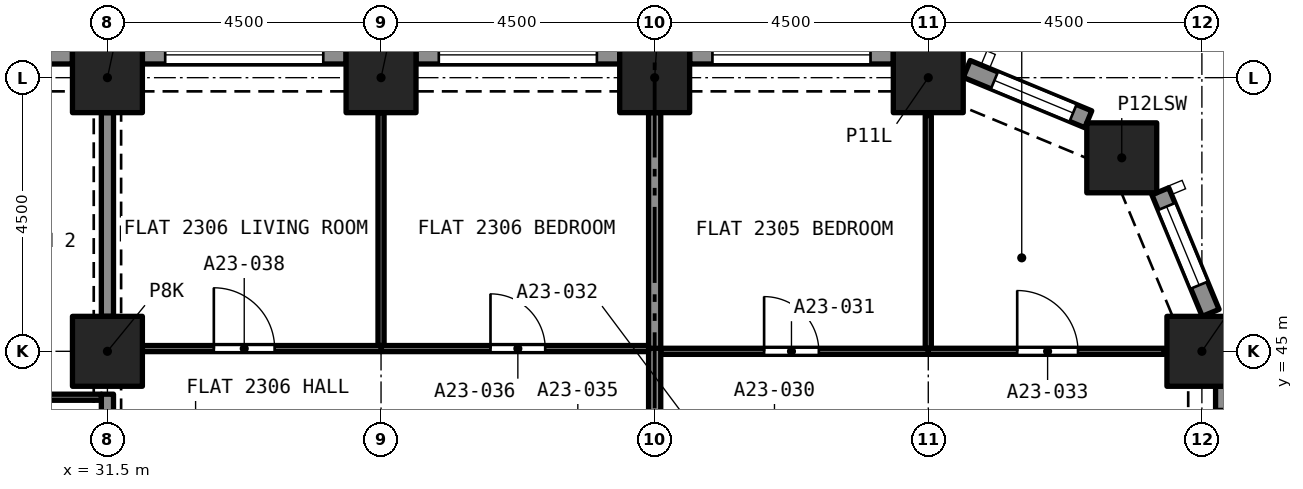
"""IFC4 building model, lengths in metres.
Left out: names, types, materials, properties, quantities, classifications, styles, units other than length and angle.
Written with IfcOpenShell. Run it as: python <this file> out.ifc"""

import sys

from ifc_helpers import new_model, si_unit, direction, frame, frame_2d, origin, origin_2d, place, context, subcontext, project, spatial, rectangle, extrude, element, fill, save


model = new_model("IFC4")
c1 = context("Model", 3, precision=1e-05, world=origin(), true_north=direction((0.0, 1.0)))
c2 = subcontext(c1, "Body", "Model", "MODEL_VIEW")
j1 = project(units=[si_unit("LENGTHUNIT", "METRE"), si_unit("PLANEANGLEUNIT", "RADIAN")], contexts=[c1])
p1 = place(None, origin())
s1 = spatial("IfcSite", under=j1, at=p1, CompositionType="ELEMENT")
p2 = place(p1, origin())
s2 = spatial("IfcBuilding", under=s1, at=p2, CompositionType="ELEMENT")
p3 = place(p2, frame((0.0, 0.0, 86.4)))
s3 = spatial("IfcBuildingStorey", under=s2, at=p3, CompositionType="ELEMENT", Elevation=86.4)
for number, where, z_axis, x_axis in (
    (1, (31.5, 45.0, 0.0), (0.0, 0.0, 1.0), (1.0, 0.0, 0.0)),
    (2, (49.5, 45.0, 0.0), (0.0, 0.0, 1.0), (1.0, 0.0, 0.0)),
    (3, (48.182, 48.182, 0.0), (0.0, 0.0, 1.0), (1.0, 0.0, 0.0)),
    (4, (31.5, 49.5, 0.0), (0.0, 0.0, 1.0), (1.0, 0.0, 0.0)),
    (5, (36.0, 49.5, 0.0), (0.0, 0.0, 1.0), (1.0, 0.0, 0.0)),
    (6, (40.5, 49.5, 0.0), (0.0, 0.0, 1.0), (1.0, 0.0, 0.0)),
    (7, (45.0, 49.5, 0.0), (0.0, 0.0, 1.0), (1.0, 0.0, 0.0)),
):
    element("IfcColumn", number, at=place(p3, frame(where, z_axis=z_axis, x_axis=x_axis)), inside=s3, PredefinedType="COLUMN", context=c2, shape_type="SweptSolid", body=[
        extrude(rectangle(XDim=1.15, YDim=1.15, at=origin_2d()), origin(), (0.0, 0.0, 1.0), 3.2),
    ])
p4 = place(p3, frame((49.875, 44.425, 0.0), z_axis=(0.0, 0.0, 1.0), x_axis=(0.0, -1.0, 0.0)))
e8 = element("IfcWall", 8, at=p4, inside=s3, PredefinedType="SOLIDWALL", context=c2, shape_type="SweptSolid", body=[
    extrude(rectangle(XDim=3.35, YDim=0.3, at=frame_2d((1.675, 0.0))), origin(), (0.0, 0.0, 1.0), 3.2),
])
p5 = place(p4, frame((0.375, 0.0, 0.45)))
e9 = element("IfcOpeningElement", 9, at=p5, cuts=e8, PredefinedType="OPENING", context=c2, shape_type="SweptSolid", body=[
    extrude(rectangle(XDim=2.6, YDim=1.95, at=frame_2d((1.3, 0.975))), frame((0.0, 0.16, 0.0), z_axis=(0.0, -1.0, 0.0), x_axis=(1.0, 0.0, 0.0)), (0.0, 0.0, 1.0), 0.32),
])
p6 = place(p3, frame((48.816, 47.631, 0.0), z_axis=(0.0, 0.0, 1.0), x_axis=(0.382723818695, -0.923862802911, 0.0)))
e10 = element("IfcWall", 10, at=p6, inside=s3, PredefinedType="SOLIDWALL", context=c2, shape_type="SweptSolid", body=[
    extrude(rectangle(XDim=2.164, YDim=0.3, at=frame_2d((1.082, 0.0))), origin(), (0.0, 0.0, 1.0), 3.2),
])
p7 = place(p6, frame((0.271, 0.0, 0.45)))
e11 = element("IfcOpeningElement", 11, at=p7, cuts=e10, PredefinedType="OPENING", context=c2, shape_type="SweptSolid", body=[
    extrude(rectangle(XDim=1.4, YDim=1.95, at=frame_2d((0.7, 0.975))), frame((0.0, 0.16, 0.0), z_axis=(0.0, -1.0, 0.0), x_axis=(1.0, 0.0, 0.0)), (0.0, 0.0, 1.0), 0.32),
])
p8 = place(p3, frame((45.632, 49.644, 0.0), z_axis=(0.0, 0.0, 1.0), x_axis=(0.923862802911, -0.382723818695, 0.0)))
e12 = element("IfcWall", 12, at=p8, inside=s3, PredefinedType="SOLIDWALL", context=c2, shape_type="SweptSolid", body=[
    extrude(rectangle(XDim=2.164, YDim=0.3, at=frame_2d((1.082, 0.0))), origin(), (0.0, 0.0, 1.0), 3.2),
])
p9 = place(p8, frame((0.493, 0.0, 0.45)))
e13 = element("IfcOpeningElement", 13, at=p9, cuts=e12, PredefinedType="OPENING", context=c2, shape_type="SweptSolid", body=[
    extrude(rectangle(XDim=1.4, YDim=1.95, at=frame_2d((0.7, 0.975))), frame((0.0, 0.16, 0.0), z_axis=(0.0, -1.0, 0.0), x_axis=(1.0, 0.0, 0.0)), (0.0, 0.0, 1.0), 0.32),
])
p10 = place(p3, frame((41.075, 49.875, 0.0), z_axis=(0.0, 0.0, 1.0), x_axis=(1.0, 0.0, 0.0)))
e14 = element("IfcWall", 14, at=p10, inside=s3, PredefinedType="SOLIDWALL", context=c2, shape_type="SweptSolid", body=[
    extrude(rectangle(XDim=3.35, YDim=0.3, at=frame_2d((1.675, 0.0))), origin(), (0.0, 0.0, 1.0), 3.2),
])
p11 = place(p10, frame((0.375, 0.0, 0.45)))
e15 = element("IfcOpeningElement", 15, at=p11, cuts=e14, PredefinedType="OPENING", context=c2, shape_type="SweptSolid", body=[
    extrude(rectangle(XDim=2.6, YDim=1.95, at=frame_2d((1.3, 0.975))), frame((0.0, 0.16, 0.0), z_axis=(0.0, -1.0, 0.0), x_axis=(1.0, 0.0, 0.0)), (0.0, 0.0, 1.0), 0.32),
])
p12 = place(p3, frame((36.575, 49.875, 0.0), z_axis=(0.0, 0.0, 1.0), x_axis=(1.0, 0.0, 0.0)))
e16 = element("IfcWall", 16, at=p12, inside=s3, PredefinedType="SOLIDWALL", context=c2, shape_type="SweptSolid", body=[
    extrude(rectangle(XDim=3.35, YDim=0.3, at=frame_2d((1.675, 0.0))), origin(), (0.0, 0.0, 1.0), 3.2),
])
p13 = place(p12, frame((0.375, 0.0, 0.45)))
e17 = element("IfcOpeningElement", 17, at=p13, cuts=e16, PredefinedType="OPENING", context=c2, shape_type="SweptSolid", body=[
    extrude(rectangle(XDim=2.6, YDim=1.95, at=frame_2d((1.3, 0.975))), frame((0.0, 0.16, 0.0), z_axis=(0.0, -1.0, 0.0), x_axis=(1.0, 0.0, 0.0)), (0.0, 0.0, 1.0), 0.32),
])
p14 = place(p3, frame((32.075, 49.875, 0.0), z_axis=(0.0, 0.0, 1.0), x_axis=(1.0, 0.0, 0.0)))
e18 = element("IfcWall", 18, at=p14, inside=s3, PredefinedType="SOLIDWALL", context=c2, shape_type="SweptSolid", body=[
    extrude(rectangle(XDim=3.35, YDim=0.3, at=frame_2d((1.675, 0.0))), origin(), (0.0, 0.0, 1.0), 3.2),
])
p15 = place(p14, frame((0.375, 0.0, 0.45)))
e19 = element("IfcOpeningElement", 19, at=p15, cuts=e18, PredefinedType="OPENING", context=c2, shape_type="SweptSolid", body=[
    extrude(rectangle(XDim=2.6, YDim=1.95, at=frame_2d((1.3, 0.975))), frame((0.0, 0.16, 0.0), z_axis=(0.0, -1.0, 0.0), x_axis=(1.0, 0.0, 0.0)), (0.0, 0.0, 1.0), 0.32),
])
p16 = place(p3, frame((27.575, 49.875, 0.0), z_axis=(0.0, 0.0, 1.0), x_axis=(1.0, 0.0, 0.0)))
e20 = element("IfcWall", 20, at=p16, inside=s3, PredefinedType="SOLIDWALL", context=c2, shape_type="SweptSolid", body=[
    extrude(rectangle(XDim=3.35, YDim=0.3, at=frame_2d((1.675, 0.0))), origin(), (0.0, 0.0, 1.0), 3.2),
])
p17 = place(p16, frame((0.375, 0.0, 0.45)))
e21 = element("IfcOpeningElement", 21, at=p17, cuts=e20, PredefinedType="OPENING", context=c2, shape_type="SweptSolid", body=[
    extrude(rectangle(XDim=2.6, YDim=1.95, at=frame_2d((1.3, 0.975))), frame((0.0, 0.16, 0.0), z_axis=(0.0, -1.0, 0.0), x_axis=(1.0, 0.0, 0.0)), (0.0, 0.0, 1.0), 0.32),
])
p18 = place(p3, frame((40.6, 45.0, 0.0), z_axis=(0.0, 0.0, 1.0), x_axis=(1.0, 0.0, 0.0)))
e22 = element("IfcWall", 22, at=p18, inside=s3, PredefinedType="PARTITIONING", context=c2, shape_type="SweptSolid", body=[
    extrude(rectangle(XDim=4.4, YDim=0.1, at=frame_2d((2.2, 0.0))), origin(), (0.0, 0.0, 1.0), 2.9),
])
p19 = place(p18, frame((1.7, 0.0, 0.0)))
e23 = element("IfcOpeningElement", 23, at=p19, cuts=e22, PredefinedType="OPENING", context=c2, shape_type="SweptSolid", body=[
    extrude(rectangle(XDim=0.9, YDim=2.1, at=frame_2d((0.45, 1.05))), frame((0.0, 0.06, 0.0), z_axis=(0.0, -1.0, 0.0), x_axis=(1.0, 0.0, 0.0)), (0.0, 0.0, 1.0), 0.12),
])
p20 = place(p3, frame((45.0, 45.05, 0.0), z_axis=(0.0, 0.0, 1.0), x_axis=(0.0, 1.0, 0.0)))
e24 = element("IfcWall", 24, at=p20, inside=s3, PredefinedType="PARTITIONING", context=c2, shape_type="SweptSolid", body=[
    extrude(rectangle(XDim=3.828, YDim=0.1, at=frame_2d((1.914, 0.0))), origin(), (0.0, 0.0, 1.0), 2.9),
])
p21 = place(p3, frame((40.5, 44.995, 0.0), z_axis=(0.0, 0.0, 1.0), x_axis=(0.0, 1.0, 0.0)))
e25 = element("IfcWall", 25, at=p21, inside=s3, PredefinedType="PARTITIONING", context=c2, shape_type="SweptSolid", body=[
    extrude(rectangle(XDim=3.93, YDim=0.2, at=frame_2d((1.965, 0.0))), origin(), (0.0, 0.0, 1.0), 2.9),
])
p22 = place(p3, frame((45.0, 45.0, 0.0), z_axis=(0.0, 0.0, 1.0), x_axis=(1.0, 0.0, 0.0)))
e26 = element("IfcWall", 26, at=p22, inside=s3, PredefinedType="PARTITIONING", context=c2, shape_type="SweptSolid", body=[
    extrude(rectangle(XDim=3.878, YDim=0.1, at=frame_2d((1.939, 0.0))), origin(), (0.0, 0.0, 1.0), 2.9),
])
p23 = place(p22, frame((1.462, 0.0, 0.0)))
e27 = element("IfcOpeningElement", 27, at=p23, cuts=e26, PredefinedType="OPENING", context=c2, shape_type="SweptSolid", body=[
    extrude(rectangle(XDim=1.0, YDim=2.1, at=frame_2d((0.5, 1.05))), frame((0.0, 0.06, 0.0), z_axis=(0.0, -1.0, 0.0), x_axis=(1.0, 0.0, 0.0)), (0.0, 0.0, 1.0), 0.12),
])
p24 = place(p3, frame((40.5, 40.35, 0.0), z_axis=(0.0, 0.0, 1.0), x_axis=(0.0, 1.0, 0.0)))
e28 = element("IfcWall", 28, at=p24, inside=s3, PredefinedType="PARTITIONING", context=c2, shape_type="SweptSolid", body=[
    extrude(rectangle(XDim=4.7, YDim=0.2, at=frame_2d((2.35, 0.0))), origin(), (0.0, 0.0, 1.0), 2.9),
])
p25 = place(p3, frame((36.0, 45.045, 0.0), z_axis=(0.0, 0.0, 1.0), x_axis=(1.0, 0.0, 0.0)))
e29 = element("IfcWall", 29, at=p25, inside=s3, PredefinedType="PARTITIONING", context=c2, shape_type="SweptSolid", body=[
    extrude(rectangle(XDim=4.4, YDim=0.1, at=frame_2d((2.2, 0.0))), origin(), (0.0, 0.0, 1.0), 2.9),
])
p26 = place(p25, frame((1.8, 0.0, 0.0)))
e30 = element("IfcOpeningElement", 30, at=p26, cuts=e29, PredefinedType="OPENING", context=c2, shape_type="SweptSolid", body=[
    extrude(rectangle(XDim=0.9, YDim=2.1, at=frame_2d((0.45, 1.05))), frame((0.0, 0.06, 0.0), z_axis=(0.0, -1.0, 0.0), x_axis=(1.0, 0.0, 0.0)), (0.0, 0.0, 1.0), 0.12),
])
p27 = place(p3, frame((36.0, 45.095, 0.0), z_axis=(0.0, 0.0, 1.0), x_axis=(0.0, 1.0, 0.0)))
e31 = element("IfcWall", 31, at=p27, inside=s3, PredefinedType="PARTITIONING", context=c2, shape_type="SweptSolid", body=[
    extrude(rectangle(XDim=3.83, YDim=0.1, at=frame_2d((1.915, 0.0))), origin(), (0.0, 0.0, 1.0), 2.9),
])
p28 = place(p3, frame((32.075, 45.045, 0.0), z_axis=(0.0, 0.0, 1.0), x_axis=(1.0, 0.0, 0.0)))
e32 = element("IfcWall", 32, at=p28, inside=s3, PredefinedType="PARTITIONING", context=c2, shape_type="SweptSolid", body=[
    extrude(rectangle(XDim=3.925, YDim=0.1, at=frame_2d((1.962, 0.0))), origin(), (0.0, 0.0, 1.0), 2.9),
])
p29 = place(p28, frame((1.175, 0.0, 0.0)))
e33 = element("IfcOpeningElement", 33, at=p29, cuts=e32, PredefinedType="OPENING", context=c2, shape_type="SweptSolid", body=[
    extrude(rectangle(XDim=1.0, YDim=2.1, at=frame_2d((0.5, 1.05))), frame((0.0, 0.06, 0.0), z_axis=(0.0, -1.0, 0.0), x_axis=(1.0, 0.0, 0.0)), (0.0, 0.0, 1.0), 0.12),
])
p30 = place(p3, frame((31.5, 41.075, 0.0), z_axis=(0.0, 0.0, 1.0), x_axis=(0.0, 1.0, 0.0)))
e34 = element("IfcWall", 34, at=p30, inside=s3, PredefinedType="PARTITIONING", context=c2, shape_type="SweptSolid", body=[
    extrude(rectangle(XDim=3.22, YDim=0.2, at=frame_2d((1.61, 0.0))), origin(), (0.0, 0.0, 1.0), 2.38),
])
p31 = place(p3, frame((31.5, 45.575, 0.0), z_axis=(0.0, 0.0, 1.0), x_axis=(0.0, 1.0, 0.0)))
e35 = element("IfcWall", 35, at=p31, inside=s3, PredefinedType="PARTITIONING", context=c2, shape_type="SweptSolid", body=[
    extrude(rectangle(XDim=3.35, YDim=0.2, at=frame_2d((1.675, 0.0))), origin(), (0.0, 0.0, 1.0), 2.38),
])
p32 = place(p3, frame((27.0, 44.245, 0.0), z_axis=(0.0, 0.0, 1.0), x_axis=(1.0, 0.0, 0.0)))
e36 = element("IfcWall", 36, at=p32, inside=s3, PredefinedType="PARTITIONING", context=c2, shape_type="SweptSolid", body=[
    extrude(rectangle(XDim=4.4, YDim=0.1, at=frame_2d((2.2, 0.0))), origin(), (0.0, 0.0, 1.0), 2.75),
])
p33 = place(p32, frame((1.8, 0.0, 0.0)))
e37 = element("IfcOpeningElement", 37, at=p33, cuts=e36, PredefinedType="OPENING", context=c2, shape_type="SweptSolid", body=[
    extrude(rectangle(XDim=0.9, YDim=2.1, at=frame_2d((0.45, 1.05))), frame((0.0, 0.06, 0.0), z_axis=(0.0, -1.0, 0.0), x_axis=(1.0, 0.0, 0.0)), (0.0, 0.0, 1.0), 0.12),
])
p34 = place(p7, origin())
e38 = element("IfcWindow", 38, at=p34, inside=s3, PartitioningType="SINGLE_PANEL", PredefinedType="WINDOW", context=c2, shape_type="SweptSolid", body=[
    extrude(rectangle(XDim=1.4, YDim=1.95, at=frame_2d((0.7, 0.975))), frame((0.0, 0.03, 0.0), z_axis=(0.0, -1.0, 0.0), x_axis=(1.0, 0.0, 0.0)), (0.0, 0.0, 1.0), 0.06),
])
fill(e11, e38)
p35 = place(p9, origin())
e39 = element("IfcWindow", 39, at=p35, inside=s3, PartitioningType="SINGLE_PANEL", PredefinedType="WINDOW", context=c2, shape_type="SweptSolid", body=[
    extrude(rectangle(XDim=1.4, YDim=1.95, at=frame_2d((0.7, 0.975))), frame((0.0, 0.03, 0.0), z_axis=(0.0, -1.0, 0.0), x_axis=(1.0, 0.0, 0.0)), (0.0, 0.0, 1.0), 0.06),
])
fill(e13, e39)
p36 = place(p11, origin())
e40 = element("IfcWindow", 40, at=p36, inside=s3, PartitioningType="SINGLE_PANEL", PredefinedType="WINDOW", context=c2, shape_type="SweptSolid", body=[
    extrude(rectangle(XDim=2.6, YDim=1.95, at=frame_2d((1.3, 0.975))), frame((0.0, 0.03, 0.0), z_axis=(0.0, -1.0, 0.0), x_axis=(1.0, 0.0, 0.0)), (0.0, 0.0, 1.0), 0.06),
])
fill(e15, e40)
p37 = place(p13, origin())
e41 = element("IfcWindow", 41, at=p37, inside=s3, PartitioningType="SINGLE_PANEL", PredefinedType="WINDOW", context=c2, shape_type="SweptSolid", body=[
    extrude(rectangle(XDim=2.6, YDim=1.95, at=frame_2d((1.3, 0.975))), frame((0.0, 0.03, 0.0), z_axis=(0.0, -1.0, 0.0), x_axis=(1.0, 0.0, 0.0)), (0.0, 0.0, 1.0), 0.06),
])
fill(e17, e41)
p38 = place(p15, origin())
e42 = element("IfcWindow", 42, at=p38, inside=s3, PartitioningType="SINGLE_PANEL", PredefinedType="WINDOW", context=c2, shape_type="SweptSolid", body=[
    extrude(rectangle(XDim=2.6, YDim=1.95, at=frame_2d((1.3, 0.975))), frame((0.0, 0.03, 0.0), z_axis=(0.0, -1.0, 0.0), x_axis=(1.0, 0.0, 0.0)), (0.0, 0.0, 1.0), 0.06),
])
fill(e19, e42)
p39 = place(p19, origin())
e43 = element("IfcDoor", 43, at=p39, inside=s3, OperationType="SINGLE_SWING_LEFT", PredefinedType="DOOR", context=c2, shape_type="SweptSolid", body=[
    extrude(rectangle(XDim=0.9, YDim=2.1, at=frame_2d((0.45, 1.05))), frame((0.0, 0.025, 0.0), z_axis=(0.0, -1.0, 0.0), x_axis=(1.0, 0.0, 0.0)), (0.0, 0.0, 1.0), 0.05),
])
fill(e23, e43)
p40 = place(p23, origin())
e44 = element("IfcDoor", 44, at=p40, inside=s3, OperationType="SINGLE_SWING_RIGHT", PredefinedType="DOOR", context=c2, shape_type="SweptSolid", body=[
    extrude(rectangle(XDim=1.0, YDim=2.1, at=frame_2d((0.5, 1.05))), frame((0.0, 0.025, 0.0), z_axis=(0.0, -1.0, 0.0), x_axis=(1.0, 0.0, 0.0)), (0.0, 0.0, 1.0), 0.05),
])
fill(e27, e44)
p41 = place(p26, origin())
e45 = element("IfcDoor", 45, at=p41, inside=s3, OperationType="SINGLE_SWING_RIGHT", PredefinedType="DOOR", context=c2, shape_type="SweptSolid", body=[
    extrude(rectangle(XDim=0.9, YDim=2.1, at=frame_2d((0.45, 1.05))), frame((0.0, 0.025, 0.0), z_axis=(0.0, -1.0, 0.0), x_axis=(1.0, 0.0, 0.0)), (0.0, 0.0, 1.0), 0.05),
])
fill(e30, e45)
p42 = place(p29, origin())
e46 = element("IfcDoor", 46, at=p42, inside=s3, OperationType="SINGLE_SWING_LEFT", PredefinedType="DOOR", context=c2, shape_type="SweptSolid", body=[
    extrude(rectangle(XDim=1.0, YDim=2.1, at=frame_2d((0.5, 1.05))), frame((0.0, 0.025, 0.0), z_axis=(0.0, -1.0, 0.0), x_axis=(1.0, 0.0, 0.0)), (0.0, 0.0, 1.0), 0.05),
])
fill(e33, e46)
save(model, sys.argv[1])
